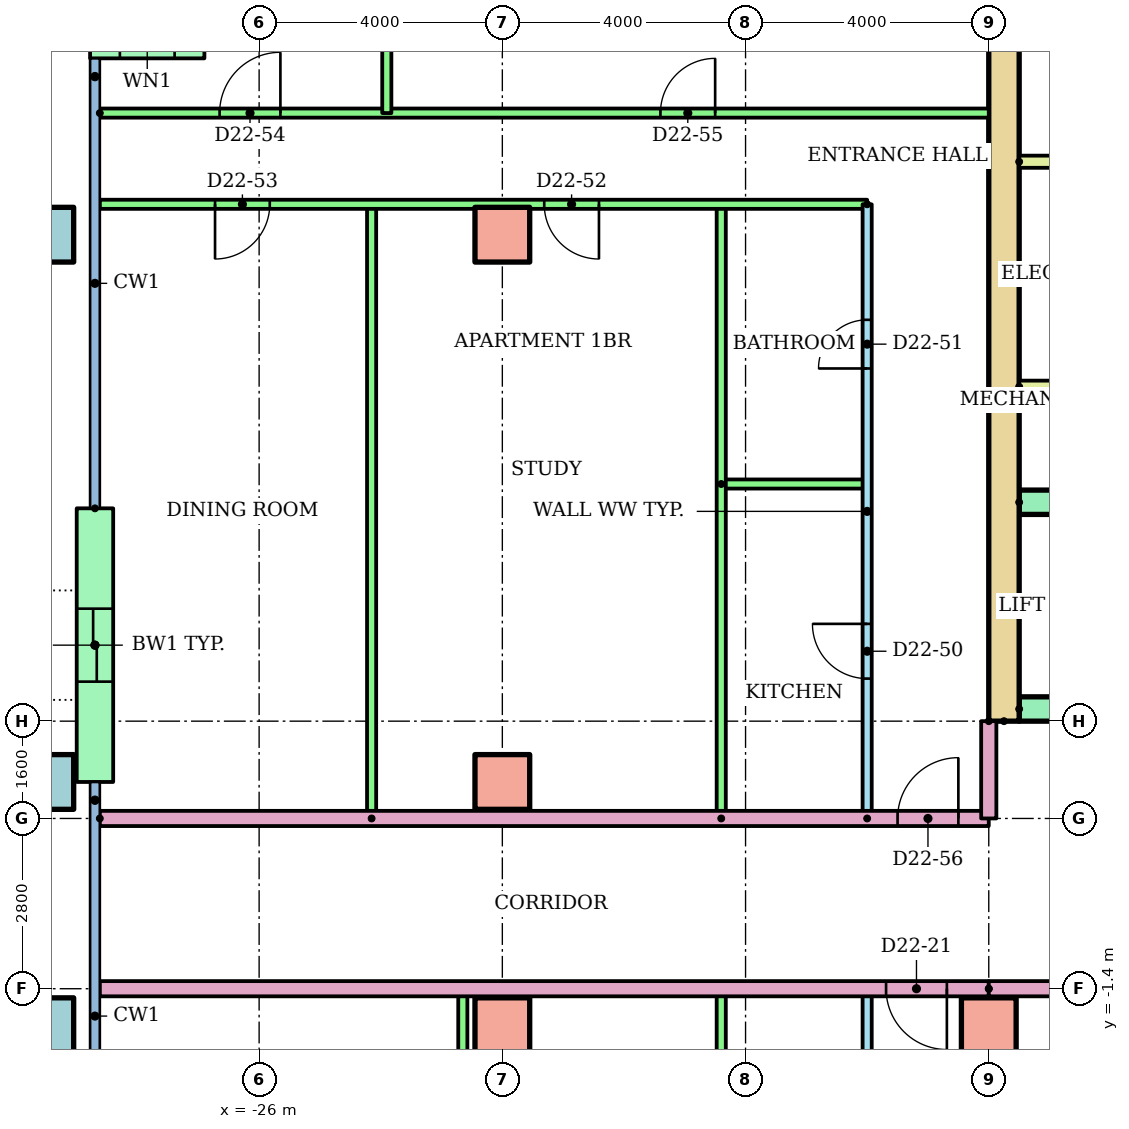
"""IFC4 building model, lengths in metres.
Left out: names, types, materials, properties, quantities, classifications, styles, units other than length and angle.
Written with IfcOpenShell. Run it as: python <this file> out.ifc"""

import sys

from ifc_helpers import new_model, si_unit, direction, frame, frame_2d, origin, origin_2d, place, context, subcontext, project, spatial, rectangle, hollow_rectangle, extrude, element, fill, save


model = new_model("IFC4")
c1 = context("Model", 3, precision=1e-05, world=origin(), true_north=direction((0.0, 1.0)))
c2 = subcontext(c1, "Body", "Model", "MODEL_VIEW")
j1 = project(units=[si_unit("LENGTHUNIT", "METRE"), si_unit("PLANEANGLEUNIT", "RADIAN")], contexts=[c1])
p1 = place(None, origin())
s1 = spatial("IfcSite", under=j1, at=p1, CompositionType="ELEMENT")
p2 = place(p1, origin())
s2 = spatial("IfcBuilding", under=s1, at=p2, CompositionType="ELEMENT")
p3 = place(p2, frame((0.0, 0.0, 87.1)))
s3 = spatial("IfcBuildingStorey", under=s2, at=p3, CompositionType="ELEMENT", Elevation=87.1)
p4 = place(p3, frame((-29.5, -2.0, 0.0)))
e1 = element("IfcColumn", 1, at=p4, inside=s3, PredefinedType="COLUMN", context=c2, shape_type="SweptSolid", body=[
    extrude(hollow_rectangle(XDim=0.9, YDim=0.9, WallThickness=0.045, at=origin_2d()), origin(), (0.0, 0.0, 1.0), 3.2),
])
for number, where in (
    (2, (-22.0, -2.0, 0.0)),
    (3, (-14.0, -2.0, 0.0)),
):
    element("IfcColumn", number, at=place(p3, frame(where)), inside=s3, PredefinedType="COLUMN", context=c2, shape_type="SweptSolid", body=[
        extrude(rectangle(XDim=0.9, YDim=0.9, at=origin_2d()), origin(), (0.0, 0.0, 1.0), 3.2),
    ])
p5 = place(p3, frame((-29.5, 2.0, 0.0)))
e4 = element("IfcColumn", 4, at=p5, inside=s3, PredefinedType="COLUMN", context=c2, shape_type="SweptSolid", body=[
    extrude(hollow_rectangle(XDim=0.9, YDim=0.9, WallThickness=0.045, at=origin_2d()), origin(), (0.0, 0.0, 1.0), 3.2),
])
p6 = place(p3, frame((-22.0, 2.0, 0.0)))
e5 = element("IfcColumn", 5, at=p6, inside=s3, PredefinedType="COLUMN", context=c2, shape_type="SweptSolid", body=[
    extrude(rectangle(XDim=0.9, YDim=0.9, at=origin_2d()), origin(), (0.0, 0.0, 1.0), 3.2),
])
p7 = place(p3, frame((-29.5, 11.0, 0.0)))
e6 = element("IfcColumn", 6, at=p7, inside=s3, PredefinedType="COLUMN", context=c2, shape_type="SweptSolid", body=[
    extrude(hollow_rectangle(XDim=0.9, YDim=0.9, WallThickness=0.045, at=origin_2d()), origin(), (0.0, 0.0, 1.0), 3.2),
])
p8 = place(p3, frame((-22.0, 11.0, 0.0)))
e7 = element("IfcColumn", 7, at=p8, inside=s3, PredefinedType="COLUMN", context=c2, shape_type="SweptSolid", body=[
    extrude(rectangle(XDim=0.9, YDim=0.9, at=origin_2d()), origin(), (0.0, 0.0, 1.0), 3.2),
])
p9 = place(p3, frame((-26.9, 14.2, 0.0), z_axis=(0.0, 0.0, 1.0), x_axis=(-1.0, 0.0, 0.0)))
e8 = element("IfcWall", 8, at=p9, inside=s3, PredefinedType="STANDARD", context=c2, shape_type="SweptSolid", body=[
    extrude(rectangle(XDim=1.88, YDim=0.6, at=frame_2d((0.94, 0.0))), origin(), (0.0, 0.0, 1.0), 2.92),
])
p10 = place(p9, frame((0.49, 0.0, 0.9)))
e9 = element("IfcOpeningElement", 9, at=p10, cuts=e8, PredefinedType="OPENING", context=c2, shape_type="SweptSolid", body=[
    extrude(rectangle(XDim=0.9, YDim=1.5, at=frame_2d((0.45, 0.75))), frame((0.0, 0.31, 0.0), z_axis=(0.0, -1.0, 0.0), x_axis=(1.0, 0.0, 0.0)), (0.0, 0.0, 1.0), 0.62),
])
p11 = place(p3, frame((-28.7, 6.5, 0.0), z_axis=(0.0, 0.0, 1.0), x_axis=(0.0, -1.0, 0.0)))
e10 = element("IfcWall", 10, at=p11, inside=s3, PredefinedType="STANDARD", context=c2, shape_type="SweptSolid", body=[
    extrude(rectangle(XDim=4.5, YDim=0.6, at=frame_2d((2.25, 0.0))), origin(), (0.0, 0.0, 1.0), 2.92),
])
p12 = place(p11, frame((1.65, 0.0, 0.0)))
e11 = element("IfcOpeningElement", 11, at=p12, cuts=e10, PredefinedType="OPENING", context=c2, shape_type="SweptSolid", body=[
    extrude(rectangle(XDim=1.2, YDim=2.1, at=frame_2d((0.6, 1.05))), frame((0.0, 0.31, 0.0), z_axis=(0.0, -1.0, 0.0), x_axis=(1.0, 0.0, 0.0)), (0.0, 0.0, 1.0), 0.62),
])
p13 = place(p3, frame((-13.75, 3.0, 0.0), z_axis=(0.0, 0.0, 1.0), x_axis=(0.0, 1.0, 0.0)))
e12 = element("IfcWall", 12, at=p13, inside=s3, PredefinedType="SHEAR", context=c2, shape_type="SweptSolid", body=[
    extrude(rectangle(XDim=17.0, YDim=0.5, at=frame_2d((8.5, 0.0))), origin(), (0.0, 0.0, 1.0), 2.92),
])
p14 = place(p3, frame((-13.5, 3.2, 0.0)))
e13 = element("IfcWall", 13, at=p14, inside=s3, PredefinedType="SHEAR", context=c2, shape_type="SweptSolid", body=[
    extrude(rectangle(XDim=27.0, YDim=0.4, at=frame_2d((13.5, 0.0))), origin(), (0.0, 0.0, 1.0), 2.92),
])
p15 = place(p14, frame((6.861, 0.0, 0.0)))
e14 = element("IfcOpeningElement", 14, at=p15, cuts=e13, PredefinedType="OPENING", context=c2, shape_type="SweptSolid", body=[
    extrude(rectangle(XDim=1.1, YDim=2.1, at=frame_2d((0.55, 1.05))), frame((0.0, 0.21, 0.0), z_axis=(0.0, -1.0, 0.0), x_axis=(1.0, 0.0, 0.0)), (0.0, 0.0, 1.0), 0.42),
])
p16 = place(p14, frame((9.906, 0.0, 0.0)))
e15 = element("IfcOpeningElement", 15, at=p16, cuts=e13, PredefinedType="OPENING", context=c2, shape_type="SweptSolid", body=[
    extrude(rectangle(XDim=1.1, YDim=2.1, at=frame_2d((0.55, 1.05))), frame((0.0, 0.21, 0.0), z_axis=(0.0, -1.0, 0.0), x_axis=(1.0, 0.0, 0.0)), (0.0, 0.0, 1.0), 0.42),
])
p17 = place(p14, frame((15.994, 0.0, 0.0)))
e16 = element("IfcOpeningElement", 16, at=p17, cuts=e13, PredefinedType="OPENING", context=c2, shape_type="SweptSolid", body=[
    extrude(rectangle(XDim=1.1, YDim=2.1, at=frame_2d((0.55, 1.05))), frame((0.0, 0.21, 0.0), z_axis=(0.0, -1.0, 0.0), x_axis=(1.0, 0.0, 0.0)), (0.0, 0.0, 1.0), 0.42),
])
p18 = place(p14, frame((19.039, 0.0, 0.0)))
e17 = element("IfcOpeningElement", 17, at=p18, cuts=e13, PredefinedType="OPENING", context=c2, shape_type="SweptSolid", body=[
    extrude(rectangle(XDim=1.1, YDim=2.1, at=frame_2d((0.55, 1.05))), frame((0.0, 0.21, 0.0), z_axis=(0.0, -1.0, 0.0), x_axis=(1.0, 0.0, 0.0)), (0.0, 0.0, 1.0), 0.42),
])
p19 = place(p14, frame((12.6, 0.0, 0.0)))
e18 = element("IfcOpeningElement", 18, at=p19, cuts=e13, PredefinedType="OPENING", context=c2, shape_type="SweptSolid", body=[
    extrude(rectangle(XDim=1.8, YDim=2.1, at=frame_2d((0.9, 1.05))), frame((0.0, 0.21, 0.0), z_axis=(0.0, -1.0, 0.0), x_axis=(1.0, 0.0, 0.0)), (0.0, 0.0, 1.0), 0.42),
])
p20 = place(p3, frame((-13.5, 6.6, 0.0)))
e19 = element("IfcWall", 19, at=p20, inside=s3, PredefinedType="SHEAR", context=c2, shape_type="SweptSolid", body=[
    extrude(rectangle(XDim=11.978, YDim=0.4, at=frame_2d((5.989, 0.0))), origin(), (0.0, 0.0, 1.0), 2.92),
])
for number, where in (
    (20, (-13.5, 8.5, 0.0)),
    (21, (-13.5, 12.2, 0.0)),
):
    element("IfcWall", number, at=place(p3, frame(where)), inside=s3, PredefinedType="PARTITIONING", context=c2, shape_type="SweptSolid", body=[
        extrude(rectangle(XDim=3.9, YDim=0.2, at=frame_2d((1.95, 0.0))), origin(), (0.0, 0.0, 1.0), 2.92),
    ])
p21 = place(p3, frame((-16.0, -9.1, 0.0), z_axis=(0.0, 0.0, 1.0), x_axis=(0.0, 1.0, 0.0)))
e22 = element("IfcWall", 22, at=p21, inside=s3, PredefinedType="PARTITIONING", context=c2, shape_type="SweptSolid", body=[
    extrude(rectangle(XDim=7.7, YDim=0.15, at=frame_2d((3.85, 0.0))), origin(), (0.0, 0.0, 1.0), 2.4),
])
p22 = place(p21, frame((5.125, 0.0, 0.0)))
e23 = element("IfcOpeningElement", 23, at=p22, cuts=e22, PredefinedType="OPENING", context=c2, shape_type="SweptSolid", body=[
    extrude(rectangle(XDim=0.9, YDim=2.1, at=frame_2d((0.45, 1.05))), frame((0.0, 0.085, 0.0), z_axis=(0.0, -1.0, 0.0), x_axis=(1.0, 0.0, 0.0)), (0.0, 0.0, 1.0), 0.17),
])
p23 = place(p21, frame((1.325, 0.0, 0.0)))
e24 = element("IfcOpeningElement", 24, at=p23, cuts=e22, PredefinedType="OPENING", context=c2, shape_type="SweptSolid", body=[
    extrude(rectangle(XDim=0.8, YDim=2.1, at=frame_2d((0.4, 1.05))), frame((0.0, 0.085, 0.0), z_axis=(0.0, -1.0, 0.0), x_axis=(1.0, 0.0, 0.0)), (0.0, 0.0, 1.0), 0.17),
])
for number, where, z_axis, x_axis in (
    (25, (-18.4, -9.1, 0.0), (0.0, 0.0, 1.0), (0.0, 1.0, 0.0)),
    (26, (-22.65, -9.1, 0.0), (0.0, 0.0, 1.0), (0.0, 1.0, 0.0)),
):
    element("IfcWall", number, at=place(p3, frame(where, z_axis=z_axis, x_axis=x_axis)), inside=s3, PredefinedType="PARTITIONING", context=c2, shape_type="SweptSolid", body=[
        extrude(rectangle(XDim=7.7, YDim=0.15, at=frame_2d((3.85, 0.0))), origin(), (0.0, 0.0, 1.0), 2.4),
    ])
p24 = place(p3, frame((-14.0, -1.4, 0.0), z_axis=(0.0, 0.0, 1.0), x_axis=(0.0, -1.0, 0.0)))
e27 = element("IfcWall", 27, at=p24, inside=s3, PredefinedType="PARTITIONING", context=c2, shape_type="SweptSolid", body=[
    extrude(rectangle(XDim=14.81, YDim=0.25, at=frame_2d((7.405, 0.0))), origin(), (0.0, 0.0, 1.0), 2.4),
])
p25 = place(p3, frame((-14.0, -1.4, 0.0), z_axis=(0.0, 0.0, 1.0), x_axis=(-1.0, 0.0, 0.0)))
e28 = element("IfcWall", 28, at=p25, inside=s3, PredefinedType="PARTITIONING", context=c2, shape_type="SweptSolid", body=[
    extrude(rectangle(XDim=14.62, YDim=0.25, at=frame_2d((7.31, 0.0))), origin(), (0.0, 0.0, 1.0), 2.4),
])
p26 = place(p25, frame((0.689, 0.0, 0.0)))
e29 = element("IfcOpeningElement", 29, at=p26, cuts=e28, PredefinedType="OPENING", context=c2, shape_type="SweptSolid", body=[
    extrude(rectangle(XDim=1.0, YDim=2.1, at=frame_2d((0.5, 1.05))), frame((0.0, 0.135, 0.0), z_axis=(0.0, -1.0, 0.0), x_axis=(1.0, 0.0, 0.0)), (0.0, 0.0, 1.0), 0.27),
])
p27 = place(p3, frame((-16.0, 1.4, 0.0), z_axis=(0.0, 0.0, 1.0), x_axis=(0.0, 1.0, 0.0)))
e30 = element("IfcWall", 30, at=p27, inside=s3, PredefinedType="PARTITIONING", context=c2, shape_type="SweptSolid", body=[
    extrude(rectangle(XDim=10.1, YDim=0.15, at=frame_2d((5.05, 0.0))), origin(), (0.0, 0.0, 1.0), 2.4),
])
p28 = place(p27, frame((2.3, 0.0, 0.0)))
e31 = element("IfcOpeningElement", 31, at=p28, cuts=e30, PredefinedType="OPENING", context=c2, shape_type="SweptSolid", body=[
    extrude(rectangle(XDim=0.9, YDim=2.1, at=frame_2d((0.45, 1.05))), frame((0.0, 0.085, 0.0), z_axis=(0.0, -1.0, 0.0), x_axis=(1.0, 0.0, 0.0)), (0.0, 0.0, 1.0), 0.17),
])
p29 = place(p27, frame((7.4, 0.0, 0.0)))
e32 = element("IfcOpeningElement", 32, at=p29, cuts=e30, PredefinedType="OPENING", context=c2, shape_type="SweptSolid", body=[
    extrude(rectangle(XDim=0.8, YDim=2.1, at=frame_2d((0.4, 1.05))), frame((0.0, 0.085, 0.0), z_axis=(0.0, -1.0, 0.0), x_axis=(1.0, 0.0, 0.0)), (0.0, 0.0, 1.0), 0.17),
])
p30 = place(p3, frame((-18.4, 6.9, 0.0)))
e33 = element("IfcWall", 33, at=p30, inside=s3, PredefinedType="PARTITIONING", context=c2, shape_type="SweptSolid", body=[
    extrude(rectangle(XDim=2.4, YDim=0.15, at=frame_2d((1.2, 0.0))), origin(), (0.0, 0.0, 1.0), 2.4),
])
for number, where, z_axis, x_axis in (
    (34, (-18.4, 1.4, 0.0), (0.0, 0.0, 1.0), (0.0, 1.0, 0.0)),
    (35, (-24.15, 1.4, 0.0), (0.0, 0.0, 1.0), (0.0, 1.0, 0.0)),
):
    element("IfcWall", number, at=place(p3, frame(where, z_axis=z_axis, x_axis=x_axis)), inside=s3, PredefinedType="PARTITIONING", context=c2, shape_type="SweptSolid", body=[
        extrude(rectangle(XDim=10.1, YDim=0.15, at=frame_2d((5.05, 0.0))), origin(), (0.0, 0.0, 1.0), 2.4),
    ])
p31 = place(p3, frame((-16.0, 11.5, 0.0), z_axis=(0.0, 0.0, 1.0), x_axis=(-1.0, 0.0, 0.0)))
e36 = element("IfcWall", 36, at=p31, inside=s3, PredefinedType="PARTITIONING", context=c2, shape_type="SweptSolid", body=[
    extrude(rectangle(XDim=12.62, YDim=0.15, at=frame_2d((6.31, 0.0))), origin(), (0.0, 0.0, 1.0), 2.4),
])
p32 = place(p31, frame((4.411, 0.0, 0.0)))
e37 = element("IfcOpeningElement", 37, at=p32, cuts=e36, PredefinedType="OPENING", context=c2, shape_type="SweptSolid", body=[
    extrude(rectangle(XDim=0.9, YDim=2.1, at=frame_2d((0.45, 1.05))), frame((0.0, 0.085, 0.0), z_axis=(0.0, -1.0, 0.0), x_axis=(1.0, 0.0, 0.0)), (0.0, 0.0, 1.0), 0.17),
])
p33 = place(p31, frame((9.825, 0.0, 0.0)))
e38 = element("IfcOpeningElement", 38, at=p33, cuts=e36, PredefinedType="OPENING", context=c2, shape_type="SweptSolid", body=[
    extrude(rectangle(XDim=0.9, YDim=2.1, at=frame_2d((0.45, 1.05))), frame((0.0, 0.085, 0.0), z_axis=(0.0, -1.0, 0.0), x_axis=(1.0, 0.0, 0.0)), (0.0, 0.0, 1.0), 0.17),
])
p34 = place(p3, frame((-28.62, 13.0, 0.0)))
e39 = element("IfcWall", 39, at=p34, inside=s3, PredefinedType="PARTITIONING", context=c2, shape_type="SweptSolid", body=[
    extrude(rectangle(XDim=14.62, YDim=0.15, at=frame_2d((7.31, 0.0))), origin(), (0.0, 0.0, 1.0), 2.4),
])
p35 = place(p34, frame((1.97, 0.0, 0.0)))
e40 = element("IfcOpeningElement", 40, at=p35, cuts=e39, PredefinedType="OPENING", context=c2, shape_type="SweptSolid", body=[
    extrude(rectangle(XDim=1.0, YDim=2.1, at=frame_2d((0.5, 1.05))), frame((0.0, 0.085, 0.0), z_axis=(0.0, -1.0, 0.0), x_axis=(1.0, 0.0, 0.0)), (0.0, 0.0, 1.0), 0.17),
])
p36 = place(p34, frame((9.22, 0.0, 0.0)))
e41 = element("IfcOpeningElement", 41, at=p36, cuts=e39, PredefinedType="OPENING", context=c2, shape_type="SweptSolid", body=[
    extrude(rectangle(XDim=0.9, YDim=2.1, at=frame_2d((0.45, 1.05))), frame((0.0, 0.085, 0.0), z_axis=(0.0, -1.0, 0.0), x_axis=(1.0, 0.0, 0.0)), (0.0, 0.0, 1.0), 0.17),
])
p37 = place(p3, frame((-23.9, 16.82, 0.0), z_axis=(0.0, 0.0, 1.0), x_axis=(0.0, -1.0, 0.0)))
e42 = element("IfcWall", 42, at=p37, inside=s3, PredefinedType="PARTITIONING", context=c2, shape_type="SweptSolid", body=[
    extrude(rectangle(XDim=3.82, YDim=0.15, at=frame_2d((1.91, 0.0))), origin(), (0.0, 0.0, 1.0), 2.4),
])
p38 = place(p3, frame((-28.62, 1.4, 0.0)))
e43 = element("IfcWall", 43, at=p38, inside=s3, PredefinedType="PARTITIONING", context=c2, shape_type="SweptSolid", body=[
    extrude(rectangle(XDim=14.62, YDim=0.25, at=frame_2d((7.31, 0.0))), origin(), (0.0, 0.0, 1.0), 2.4),
])
p39 = place(p38, frame((13.12, 0.0, 0.0)))
e44 = element("IfcOpeningElement", 44, at=p39, cuts=e43, PredefinedType="OPENING", context=c2, shape_type="SweptSolid", body=[
    extrude(rectangle(XDim=1.0, YDim=2.1, at=frame_2d((0.5, 1.05))), frame((0.0, 0.135, 0.0), z_axis=(0.0, -1.0, 0.0), x_axis=(1.0, 0.0, 0.0)), (0.0, 0.0, 1.0), 0.27),
])
p40 = place(p3, frame((14.0, -1.4, 0.0), z_axis=(0.0, 0.0, 1.0), x_axis=(-1.0, 0.0, 0.0)))
e45 = element("IfcWall", 45, at=p40, inside=s3, PredefinedType="PARTITIONING", context=c2, shape_type="SweptSolid", body=[
    extrude(rectangle(XDim=28.0, YDim=0.25, at=frame_2d((14.0, 0.0))), origin(), (0.0, 0.0, 1.0), 2.4),
])
p41 = place(p40, frame((12.689, 0.0, 0.0)))
e46 = element("IfcOpeningElement", 46, at=p41, cuts=e45, PredefinedType="OPENING", context=c2, shape_type="SweptSolid", body=[
    extrude(rectangle(XDim=1.0, YDim=2.1, at=frame_2d((0.5, 1.05))), frame((0.0, 0.135, 0.0), z_axis=(0.0, -1.0, 0.0), x_axis=(1.0, 0.0, 0.0)), (0.0, 0.0, 1.0), 0.27),
])
p42 = place(p40, frame((10.311, 0.0, 0.0)))
e47 = element("IfcOpeningElement", 47, at=p42, cuts=e45, PredefinedType="OPENING", context=c2, shape_type="SweptSolid", body=[
    extrude(rectangle(XDim=1.0, YDim=2.1, at=frame_2d((0.5, 1.05))), frame((0.0, 0.135, 0.0), z_axis=(0.0, -1.0, 0.0), x_axis=(1.0, 0.0, 0.0)), (0.0, 0.0, 1.0), 0.27),
])
p43 = place(p3, frame((-14.0, 3.0, 0.0), z_axis=(0.0, 0.0, 1.0), x_axis=(0.0, -1.0, 0.0)))
e48 = element("IfcWall", 48, at=p43, inside=s3, PredefinedType="PARTITIONING", context=c2, shape_type="SweptSolid", body=[
    extrude(rectangle(XDim=1.6, YDim=0.25, at=frame_2d((0.8, 0.0))), origin(), (0.0, 0.0, 1.0), 2.4),
])
p44 = place(p26, origin())
e49 = element("IfcDoor", 49, at=p44, inside=s3, OperationType="SINGLE_SWING_LEFT", PredefinedType="DOOR", context=c2, shape_type="SweptSolid", body=[
    extrude(rectangle(XDim=1.0, YDim=2.1, at=frame_2d((0.5, 1.05))), frame((0.0, 0.025, 0.0), z_axis=(0.0, -1.0, 0.0), x_axis=(1.0, 0.0, 0.0)), (0.0, 0.0, 1.0), 0.05),
])
fill(e29, e49)
p45 = place(p28, origin())
e50 = element("IfcDoor", 50, at=p45, inside=s3, OperationType="SINGLE_SWING_RIGHT", PredefinedType="DOOR", context=c2, shape_type="SweptSolid", body=[
    extrude(rectangle(XDim=0.9, YDim=2.1, at=frame_2d((0.45, 1.05))), frame((0.0, 0.025, 0.0), z_axis=(0.0, -1.0, 0.0), x_axis=(1.0, 0.0, 0.0)), (0.0, 0.0, 1.0), 0.05),
])
fill(e31, e50)
p46 = place(p29, origin())
e51 = element("IfcDoor", 51, at=p46, inside=s3, OperationType="SINGLE_SWING_LEFT", PredefinedType="DOOR", context=c2, shape_type="SweptSolid", body=[
    extrude(rectangle(XDim=0.8, YDim=2.1, at=frame_2d((0.4, 1.05))), frame((0.0, 0.025, 0.0), z_axis=(0.0, -1.0, 0.0), x_axis=(1.0, 0.0, 0.0)), (0.0, 0.0, 1.0), 0.05),
])
fill(e32, e51)
p47 = place(p32, origin())
e52 = element("IfcDoor", 52, at=p47, inside=s3, OperationType="SINGLE_SWING_LEFT", PredefinedType="DOOR", context=c2, shape_type="SweptSolid", body=[
    extrude(rectangle(XDim=0.9, YDim=2.1, at=frame_2d((0.45, 1.05))), frame((0.0, 0.025, 0.0), z_axis=(0.0, -1.0, 0.0), x_axis=(1.0, 0.0, 0.0)), (0.0, 0.0, 1.0), 0.05),
])
fill(e37, e52)
p48 = place(p33, origin())
e53 = element("IfcDoor", 53, at=p48, inside=s3, OperationType="SINGLE_SWING_RIGHT", PredefinedType="DOOR", context=c2, shape_type="SweptSolid", body=[
    extrude(rectangle(XDim=0.9, YDim=2.1, at=frame_2d((0.45, 1.05))), frame((0.0, 0.025, 0.0), z_axis=(0.0, -1.0, 0.0), x_axis=(1.0, 0.0, 0.0)), (0.0, 0.0, 1.0), 0.05),
])
fill(e38, e53)
p49 = place(p35, origin())
e54 = element("IfcDoor", 54, at=p49, inside=s3, OperationType="SINGLE_SWING_RIGHT", PredefinedType="DOOR", context=c2, shape_type="SweptSolid", body=[
    extrude(rectangle(XDim=1.0, YDim=2.1, at=frame_2d((0.5, 1.05))), frame((0.0, 0.025, 0.0), z_axis=(0.0, -1.0, 0.0), x_axis=(1.0, 0.0, 0.0)), (0.0, 0.0, 1.0), 0.05),
])
fill(e40, e54)
p50 = place(p36, origin())
e55 = element("IfcDoor", 55, at=p50, inside=s3, OperationType="SINGLE_SWING_RIGHT", PredefinedType="DOOR", context=c2, shape_type="SweptSolid", body=[
    extrude(rectangle(XDim=0.9, YDim=2.1, at=frame_2d((0.45, 1.05))), frame((0.0, 0.025, 0.0), z_axis=(0.0, -1.0, 0.0), x_axis=(1.0, 0.0, 0.0)), (0.0, 0.0, 1.0), 0.05),
])
fill(e41, e55)
p51 = place(p39, origin())
e56 = element("IfcDoor", 56, at=p51, inside=s3, OperationType="SINGLE_SWING_RIGHT", PredefinedType="DOOR", context=c2, shape_type="SweptSolid", body=[
    extrude(rectangle(XDim=1.0, YDim=2.1, at=frame_2d((0.5, 1.05))), frame((0.0, 0.025, 0.0), z_axis=(0.0, -1.0, 0.0), x_axis=(1.0, 0.0, 0.0)), (0.0, 0.0, 1.0), 0.05),
])
fill(e44, e56)
p52 = place(p12, origin())
e57 = element("IfcDoor", 57, at=p52, inside=s3, OperationType="SLIDING_TO_LEFT", PredefinedType="DOOR", context=c2, shape_type="SweptSolid", body=[
    extrude(rectangle(XDim=1.2, YDim=2.1, at=frame_2d((0.6, 1.05))), frame((0.0, 0.025, 0.0), z_axis=(0.0, -1.0, 0.0), x_axis=(1.0, 0.0, 0.0)), (0.0, 0.0, 1.0), 0.05),
])
fill(e11, e57)
save(model, sys.argv[1])
